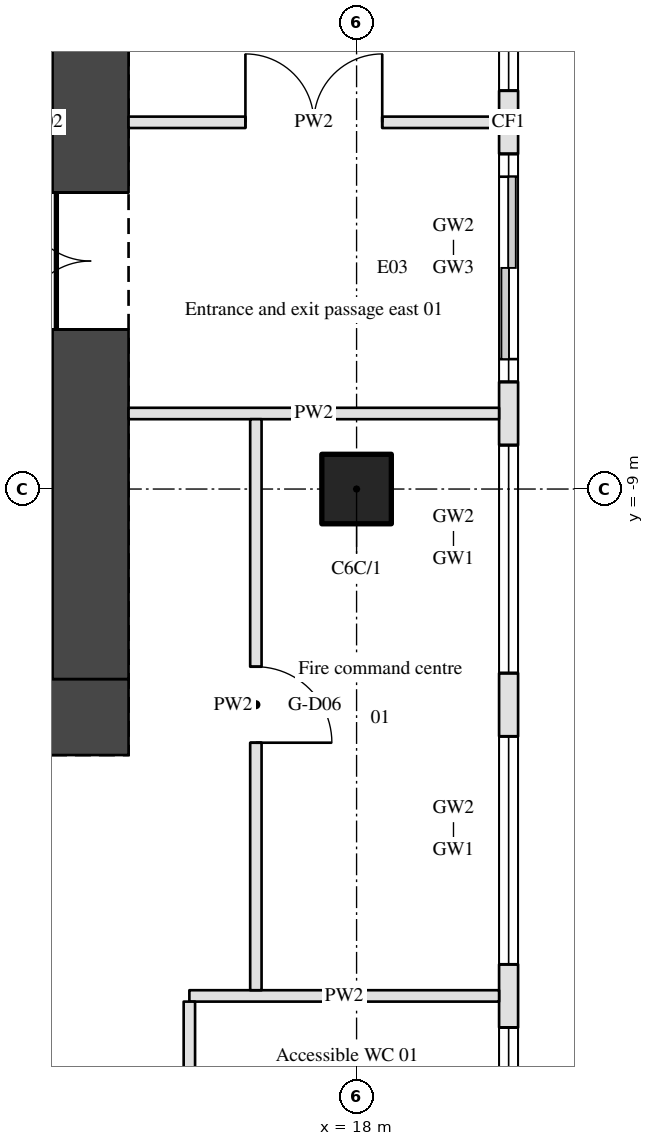
"""IFC4 building model, lengths in metres.
Left out: names, types, materials, properties, quantities, classifications, styles, units other than length and angle.
Written with IfcOpenShell. Run it as: python <this file> out.ifc"""

import sys

from ifc_helpers import new_model, si_unit, direction, frame, frame_2d, origin, origin_2d, place, context, subcontext, project, spatial, rectangle, hollow_circle, extrude, element, fill, save


model = new_model("IFC4")
c1 = context("Model", 3, precision=1e-05, world=origin(), true_north=direction((0.0, 1.0)))
c2 = subcontext(c1, "Body", "Model", "MODEL_VIEW")
j1 = project(units=[si_unit("LENGTHUNIT", "METRE"), si_unit("PLANEANGLEUNIT", "RADIAN")], contexts=[c1])
p1 = place(None, origin())
s1 = spatial("IfcSite", under=j1, at=p1, CompositionType="ELEMENT")
p2 = place(p1, origin())
s2 = spatial("IfcBuilding", under=s1, at=p2, CompositionType="ELEMENT")
p3 = place(p2, origin())
s3 = spatial("IfcBuildingStorey", under=s2, at=p3, CompositionType="ELEMENT", Elevation=0.0)
p4 = place(p3, frame((18.0, -9.0, 0.0), z_axis=(0.0, 0.0, 1.0), x_axis=(1.0, 0.0, 0.0)))
e1 = element("IfcColumn", 1, at=p4, inside=s3, PredefinedType="COLUMN", context=c2, shape_type="SweptSolid", body=[
    extrude(hollow_circle(Radius=0.457, WallThickness=0.05, at=origin_2d()), origin(), (0.0, 0.0, 1.0), 10.8),
])
p5 = place(p3, frame((-15.0, -12.0, 0.0), z_axis=(0.0, 0.0, 1.0), x_axis=(1.0, 0.0, 0.0)))
e2 = element("IfcWall", 2, at=p5, inside=s3, PredefinedType="SHEAR", context=c2, shape_type="SweptSolid", body=[
    extrude(rectangle(XDim=30.0, YDim=1.0, at=frame_2d((15.0, 0.0))), origin(), (0.0, 0.0, 1.0), 10.8),
])
p6 = place(p3, frame((14.5, -11.5, 0.0), z_axis=(0.0, 0.0, 1.0), x_axis=(0.0, 1.0, 0.0)))
e3 = element("IfcWall", 3, at=p6, inside=s3, PredefinedType="SHEAR", context=c2, shape_type="SweptSolid", body=[
    extrude(rectangle(XDim=14.65, YDim=1.0, at=frame_2d((7.325, 0.0))), origin(), (0.0, 0.0, 1.0), 10.8),
])
p7 = place(p6, frame((9.6, 0.0, 0.0)))
e4 = element("IfcOpeningElement", 4, at=p7, cuts=e3, PredefinedType="OPENING", context=c2, shape_type="SweptSolid", body=[
    extrude(rectangle(XDim=1.8, YDim=2.1, at=frame_2d((0.9, 1.05))), frame((0.0, 0.51, 0.0), z_axis=(0.0, -1.0, 0.0), x_axis=(1.0, 0.0, 0.0)), (0.0, 0.0, 1.0), 1.02),
])
p8 = place(p6, frame((4.6, 0.0, 0.0)))
e5 = element("IfcOpeningElement", 5, at=p8, cuts=e3, PredefinedType="OPENING", context=c2, shape_type="SweptSolid", body=[
    extrude(rectangle(XDim=1.8, YDim=2.1, at=frame_2d((0.9, 1.05))), frame((0.0, 0.51, 0.0), z_axis=(0.0, -1.0, 0.0), x_axis=(1.0, 0.0, 0.0)), (0.0, 0.0, 1.0), 1.02),
])
p9 = place(p3, frame((20.0, -19.375, 0.0), z_axis=(0.0, 0.0, 1.0), x_axis=(0.0, 1.0, 0.0)))
e6 = element("IfcWall", 6, at=p9, inside=s3, PredefinedType="STANDARD", context=c2, shape_type="SweptSolid", body=[
    extrude(rectangle(XDim=30.4, YDim=0.25, at=frame_2d((15.2, 0.0))), origin(), (0.0, 0.0, 1.0), 10.0),
])
p10 = place(p9, frame((0.291, 0.0, 0.15)))
e7 = element("IfcOpeningElement", 7, at=p10, cuts=e6, PredefinedType="OPENING", context=c2, shape_type="SweptSolid", body=[
    extrude(rectangle(XDim=3.0, YDim=4.2, at=frame_2d((1.5, 2.1))), frame((0.0, 0.135, 0.0), z_axis=(0.0, -1.0, 0.0), x_axis=(1.0, 0.0, 0.0)), (0.0, 0.0, 1.0), 0.27),
])
p11 = place(p9, frame((0.291, 0.0, 4.95)))
e8 = element("IfcOpeningElement", 8, at=p11, cuts=e6, PredefinedType="OPENING", context=c2, shape_type="SweptSolid", body=[
    extrude(rectangle(XDim=3.0, YDim=4.4, at=frame_2d((1.5, 2.2))), frame((0.0, 0.135, 0.0), z_axis=(0.0, -1.0, 0.0), x_axis=(1.0, 0.0, 0.0)), (0.0, 0.0, 1.0), 0.27),
])
p12 = place(p9, frame((4.122, 0.0, 0.15)))
e9 = element("IfcOpeningElement", 9, at=p12, cuts=e6, PredefinedType="OPENING", context=c2, shape_type="SweptSolid", body=[
    extrude(rectangle(XDim=3.0, YDim=4.2, at=frame_2d((1.5, 2.1))), frame((0.0, 0.135, 0.0), z_axis=(0.0, -1.0, 0.0), x_axis=(1.0, 0.0, 0.0)), (0.0, 0.0, 1.0), 0.27),
])
p13 = place(p9, frame((4.122, 0.0, 4.95)))
e10 = element("IfcOpeningElement", 10, at=p13, cuts=e6, PredefinedType="OPENING", context=c2, shape_type="SweptSolid", body=[
    extrude(rectangle(XDim=3.0, YDim=4.4, at=frame_2d((1.5, 2.2))), frame((0.0, 0.135, 0.0), z_axis=(0.0, -1.0, 0.0), x_axis=(1.0, 0.0, 0.0)), (0.0, 0.0, 1.0), 0.27),
])
p14 = place(p9, frame((7.953, 0.0, 0.15)))
e11 = element("IfcOpeningElement", 11, at=p14, cuts=e6, PredefinedType="OPENING", context=c2, shape_type="SweptSolid", body=[
    extrude(rectangle(XDim=3.0, YDim=4.2, at=frame_2d((1.5, 2.1))), frame((0.0, 0.135, 0.0), z_axis=(0.0, -1.0, 0.0), x_axis=(1.0, 0.0, 0.0)), (0.0, 0.0, 1.0), 0.27),
])
p15 = place(p9, frame((7.953, 0.0, 4.95)))
e12 = element("IfcOpeningElement", 12, at=p15, cuts=e6, PredefinedType="OPENING", context=c2, shape_type="SweptSolid", body=[
    extrude(rectangle(XDim=3.0, YDim=4.4, at=frame_2d((1.5, 2.2))), frame((0.0, 0.135, 0.0), z_axis=(0.0, -1.0, 0.0), x_axis=(1.0, 0.0, 0.0)), (0.0, 0.0, 1.0), 0.27),
])
p16 = place(p9, frame((12.084, 0.0, 0.0)))
e13 = element("IfcOpeningElement", 13, at=p16, cuts=e6, PredefinedType="OPENING", context=c2, shape_type="SweptSolid", body=[
    extrude(rectangle(XDim=2.4, YDim=2.6, at=frame_2d((1.2, 1.3))), frame((0.0, 0.135, 0.0), z_axis=(0.0, -1.0, 0.0), x_axis=(1.0, 0.0, 0.0)), (0.0, 0.0, 1.0), 0.27),
])
p17 = place(p9, frame((11.784, 0.0, 2.9)))
e14 = element("IfcOpeningElement", 14, at=p17, cuts=e6, PredefinedType="OPENING", context=c2, shape_type="SweptSolid", body=[
    extrude(rectangle(XDim=3.0, YDim=1.45, at=frame_2d((1.5, 0.725))), frame((0.0, 0.135, 0.0), z_axis=(0.0, -1.0, 0.0), x_axis=(1.0, 0.0, 0.0)), (0.0, 0.0, 1.0), 0.27),
])
p18 = place(p9, frame((11.784, 0.0, 4.95)))
e15 = element("IfcOpeningElement", 15, at=p18, cuts=e6, PredefinedType="OPENING", context=c2, shape_type="SweptSolid", body=[
    extrude(rectangle(XDim=3.0, YDim=4.4, at=frame_2d((1.5, 2.2))), frame((0.0, 0.135, 0.0), z_axis=(0.0, -1.0, 0.0), x_axis=(1.0, 0.0, 0.0)), (0.0, 0.0, 1.0), 0.27),
])
p19 = place(p9, frame((15.616, 0.0, 0.15)))
e16 = element("IfcOpeningElement", 16, at=p19, cuts=e6, PredefinedType="OPENING", context=c2, shape_type="SweptSolid", body=[
    extrude(rectangle(XDim=3.0, YDim=4.2, at=frame_2d((1.5, 2.1))), frame((0.0, 0.135, 0.0), z_axis=(0.0, -1.0, 0.0), x_axis=(1.0, 0.0, 0.0)), (0.0, 0.0, 1.0), 0.27),
])
p20 = place(p9, frame((15.616, 0.0, 4.95)))
e17 = element("IfcOpeningElement", 17, at=p20, cuts=e6, PredefinedType="OPENING", context=c2, shape_type="SweptSolid", body=[
    extrude(rectangle(XDim=3.0, YDim=4.4, at=frame_2d((1.5, 2.2))), frame((0.0, 0.135, 0.0), z_axis=(0.0, -1.0, 0.0), x_axis=(1.0, 0.0, 0.0)), (0.0, 0.0, 1.0), 0.27),
])
p21 = place(p9, frame((19.447, 0.0, 0.15)))
e18 = element("IfcOpeningElement", 18, at=p21, cuts=e6, PredefinedType="OPENING", context=c2, shape_type="SweptSolid", body=[
    extrude(rectangle(XDim=3.0, YDim=4.2, at=frame_2d((1.5, 2.1))), frame((0.0, 0.135, 0.0), z_axis=(0.0, -1.0, 0.0), x_axis=(1.0, 0.0, 0.0)), (0.0, 0.0, 1.0), 0.27),
])
p22 = place(p9, frame((19.447, 0.0, 4.95)))
e19 = element("IfcOpeningElement", 19, at=p22, cuts=e6, PredefinedType="OPENING", context=c2, shape_type="SweptSolid", body=[
    extrude(rectangle(XDim=3.0, YDim=4.4, at=frame_2d((1.5, 2.2))), frame((0.0, 0.135, 0.0), z_axis=(0.0, -1.0, 0.0), x_axis=(1.0, 0.0, 0.0)), (0.0, 0.0, 1.0), 0.27),
])
p23 = place(p9, frame((23.278, 0.0, 0.15)))
e20 = element("IfcOpeningElement", 20, at=p23, cuts=e6, PredefinedType="OPENING", context=c2, shape_type="SweptSolid", body=[
    extrude(rectangle(XDim=3.0, YDim=4.2, at=frame_2d((1.5, 2.1))), frame((0.0, 0.135, 0.0), z_axis=(0.0, -1.0, 0.0), x_axis=(1.0, 0.0, 0.0)), (0.0, 0.0, 1.0), 0.27),
])
p24 = place(p9, frame((23.278, 0.0, 4.95)))
e21 = element("IfcOpeningElement", 21, at=p24, cuts=e6, PredefinedType="OPENING", context=c2, shape_type="SweptSolid", body=[
    extrude(rectangle(XDim=3.0, YDim=4.4, at=frame_2d((1.5, 2.2))), frame((0.0, 0.135, 0.0), z_axis=(0.0, -1.0, 0.0), x_axis=(1.0, 0.0, 0.0)), (0.0, 0.0, 1.0), 0.27),
])
p25 = place(p9, frame((27.109, 0.0, 0.15)))
e22 = element("IfcOpeningElement", 22, at=p25, cuts=e6, PredefinedType="OPENING", context=c2, shape_type="SweptSolid", body=[
    extrude(rectangle(XDim=3.0, YDim=4.2, at=frame_2d((1.5, 2.1))), frame((0.0, 0.135, 0.0), z_axis=(0.0, -1.0, 0.0), x_axis=(1.0, 0.0, 0.0)), (0.0, 0.0, 1.0), 0.27),
])
p26 = place(p9, frame((27.109, 0.0, 4.95)))
e23 = element("IfcOpeningElement", 23, at=p26, cuts=e6, PredefinedType="OPENING", context=c2, shape_type="SweptSolid", body=[
    extrude(rectangle(XDim=3.0, YDim=4.4, at=frame_2d((1.5, 2.2))), frame((0.0, 0.135, 0.0), z_axis=(0.0, -1.0, 0.0), x_axis=(1.0, 0.0, 0.0)), (0.0, 0.0, 1.0), 0.27),
])
p27 = place(p3, frame((15.8, -15.669, 0.0), z_axis=(0.0, 0.0, 1.0), x_axis=(1.0, 0.0, 0.0)))
e24 = element("IfcWall", 24, at=p27, inside=s3, PredefinedType="PARTITIONING", context=c2, shape_type="SweptSolid", body=[
    extrude(rectangle(XDim=4.075, YDim=0.15, at=frame_2d((2.038, 0.0))), origin(), (0.0, 0.0, 1.0), 9.86),
])
p28 = place(p3, frame((15.0, -8.006, 0.0), z_axis=(0.0, 0.0, 1.0), x_axis=(1.0, 0.0, 0.0)))
e25 = element("IfcWall", 25, at=p28, inside=s3, PredefinedType="PARTITIONING", context=c2, shape_type="SweptSolid", body=[
    extrude(rectangle(XDim=4.875, YDim=0.15, at=frame_2d((2.438, 0.0))), origin(), (0.0, 0.0, 1.0), 9.86),
])
p29 = place(p3, frame((15.0, -4.175, 0.0), z_axis=(0.0, 0.0, 1.0), x_axis=(1.0, 0.0, 0.0)))
e26 = element("IfcWall", 26, at=p29, inside=s3, PredefinedType="PARTITIONING", context=c2, shape_type="SweptSolid", body=[
    extrude(rectangle(XDim=4.875, YDim=0.15, at=frame_2d((2.438, 0.0))), origin(), (0.0, 0.0, 1.0), 9.86),
])
p30 = place(p29, frame((1.538, 0.0, 0.0)))
e27 = element("IfcOpeningElement", 27, at=p30, cuts=e26, PredefinedType="OPENING", context=c2, shape_type="SweptSolid", body=[
    extrude(rectangle(XDim=1.8, YDim=2.1, at=frame_2d((0.9, 1.05))), frame((0.0, 0.085, 0.0), z_axis=(0.0, -1.0, 0.0), x_axis=(1.0, 0.0, 0.0)), (0.0, 0.0, 1.0), 0.17),
])
p31 = place(p3, frame((15.8, -15.744, 0.0), z_axis=(0.0, 0.0, 1.0), x_axis=(0.0, -1.0, 0.0)))
e28 = element("IfcWall", 28, at=p31, inside=s3, PredefinedType="PARTITIONING", context=c2, shape_type="SweptSolid", body=[
    extrude(rectangle(XDim=3.631, YDim=0.15, at=frame_2d((1.815, 0.0))), origin(), (0.0, 0.0, 1.0), 9.86),
])
p32 = place(p31, frame((1.365, 0.0, 0.0)))
e29 = element("IfcOpeningElement", 29, at=p32, cuts=e28, PredefinedType="OPENING", context=c2, shape_type="SweptSolid", body=[
    extrude(rectangle(XDim=0.9, YDim=2.1, at=frame_2d((0.45, 1.05))), frame((0.0, 0.085, 0.0), z_axis=(0.0, -1.0, 0.0), x_axis=(1.0, 0.0, 0.0)), (0.0, 0.0, 1.0), 0.17),
])
p33 = place(p3, frame((16.675, -8.081, 0.0), z_axis=(0.0, 0.0, 1.0), x_axis=(0.0, -1.0, 0.0)))
e30 = element("IfcWall", 30, at=p33, inside=s3, PredefinedType="PARTITIONING", context=c2, shape_type="SweptSolid", body=[
    extrude(rectangle(XDim=7.513, YDim=0.15, at=frame_2d((3.756, 0.0))), origin(), (0.0, 0.0, 1.0), 9.86),
])
p34 = place(p33, frame((3.257, 0.0, 0.0)))
e31 = element("IfcOpeningElement", 31, at=p34, cuts=e30, PredefinedType="OPENING", context=c2, shape_type="SweptSolid", body=[
    extrude(rectangle(XDim=1.0, YDim=2.1, at=frame_2d((0.5, 1.05))), frame((0.0, 0.085, 0.0), z_axis=(0.0, -1.0, 0.0), x_axis=(1.0, 0.0, 0.0)), (0.0, 0.0, 1.0), 0.17),
])
p35 = place(p10, origin())
e32 = element("IfcWindow", 32, at=p35, inside=s3, PartitioningType="DOUBLE_PANEL_HORIZONTAL", PredefinedType="WINDOW", context=c2, shape_type="SweptSolid", body=[
    extrude(rectangle(XDim=3.0, YDim=4.2, at=frame_2d((1.5, 2.1))), frame((0.0, 0.03, 0.0), z_axis=(0.0, -1.0, 0.0), x_axis=(1.0, 0.0, 0.0)), (0.0, 0.0, 1.0), 0.06),
])
fill(e7, e32)
p36 = place(p11, origin())
e33 = element("IfcWindow", 33, at=p36, inside=s3, PartitioningType="DOUBLE_PANEL_HORIZONTAL", PredefinedType="WINDOW", context=c2, shape_type="SweptSolid", body=[
    extrude(rectangle(XDim=3.0, YDim=4.4, at=frame_2d((1.5, 2.2))), frame((0.0, 0.03, 0.0), z_axis=(0.0, -1.0, 0.0), x_axis=(1.0, 0.0, 0.0)), (0.0, 0.0, 1.0), 0.06),
])
fill(e8, e33)
p37 = place(p12, origin())
e34 = element("IfcWindow", 34, at=p37, inside=s3, PartitioningType="DOUBLE_PANEL_HORIZONTAL", PredefinedType="WINDOW", context=c2, shape_type="SweptSolid", body=[
    extrude(rectangle(XDim=3.0, YDim=4.2, at=frame_2d((1.5, 2.1))), frame((0.0, 0.03, 0.0), z_axis=(0.0, -1.0, 0.0), x_axis=(1.0, 0.0, 0.0)), (0.0, 0.0, 1.0), 0.06),
])
fill(e9, e34)
p38 = place(p13, origin())
e35 = element("IfcWindow", 35, at=p38, inside=s3, PartitioningType="DOUBLE_PANEL_HORIZONTAL", PredefinedType="WINDOW", context=c2, shape_type="SweptSolid", body=[
    extrude(rectangle(XDim=3.0, YDim=4.4, at=frame_2d((1.5, 2.2))), frame((0.0, 0.03, 0.0), z_axis=(0.0, -1.0, 0.0), x_axis=(1.0, 0.0, 0.0)), (0.0, 0.0, 1.0), 0.06),
])
fill(e10, e35)
p39 = place(p14, origin())
e36 = element("IfcWindow", 36, at=p39, inside=s3, PartitioningType="DOUBLE_PANEL_HORIZONTAL", PredefinedType="WINDOW", context=c2, shape_type="SweptSolid", body=[
    extrude(rectangle(XDim=3.0, YDim=4.2, at=frame_2d((1.5, 2.1))), frame((0.0, 0.03, 0.0), z_axis=(0.0, -1.0, 0.0), x_axis=(1.0, 0.0, 0.0)), (0.0, 0.0, 1.0), 0.06),
])
fill(e11, e36)
p40 = place(p15, origin())
e37 = element("IfcWindow", 37, at=p40, inside=s3, PartitioningType="DOUBLE_PANEL_HORIZONTAL", PredefinedType="WINDOW", context=c2, shape_type="SweptSolid", body=[
    extrude(rectangle(XDim=3.0, YDim=4.4, at=frame_2d((1.5, 2.2))), frame((0.0, 0.03, 0.0), z_axis=(0.0, -1.0, 0.0), x_axis=(1.0, 0.0, 0.0)), (0.0, 0.0, 1.0), 0.06),
])
fill(e12, e37)
p41 = place(p16, origin())
e38 = element("IfcDoor", 38, at=p41, inside=s3, OperationType="DOUBLE_DOOR_SLIDING", PredefinedType="DOOR", context=c2, shape_type="SweptSolid", body=[
    extrude(rectangle(XDim=2.4, YDim=2.6, at=frame_2d((1.2, 1.3))), frame((0.0, 0.025, 0.0), z_axis=(0.0, -1.0, 0.0), x_axis=(1.0, 0.0, 0.0)), (0.0, 0.0, 1.0), 0.05),
])
fill(e13, e38)
p42 = place(p17, origin())
e39 = element("IfcWindow", 39, at=p42, inside=s3, PartitioningType="SINGLE_PANEL", PredefinedType="WINDOW", context=c2, shape_type="SweptSolid", body=[
    extrude(rectangle(XDim=3.0, YDim=1.45, at=frame_2d((1.5, 0.725))), frame((0.0, 0.03, 0.0), z_axis=(0.0, -1.0, 0.0), x_axis=(1.0, 0.0, 0.0)), (0.0, 0.0, 1.0), 0.06),
])
fill(e14, e39)
p43 = place(p18, origin())
e40 = element("IfcWindow", 40, at=p43, inside=s3, PartitioningType="DOUBLE_PANEL_HORIZONTAL", PredefinedType="WINDOW", context=c2, shape_type="SweptSolid", body=[
    extrude(rectangle(XDim=3.0, YDim=4.4, at=frame_2d((1.5, 2.2))), frame((0.0, 0.03, 0.0), z_axis=(0.0, -1.0, 0.0), x_axis=(1.0, 0.0, 0.0)), (0.0, 0.0, 1.0), 0.06),
])
fill(e15, e40)
p44 = place(p19, origin())
e41 = element("IfcWindow", 41, at=p44, inside=s3, PartitioningType="DOUBLE_PANEL_HORIZONTAL", PredefinedType="WINDOW", context=c2, shape_type="SweptSolid", body=[
    extrude(rectangle(XDim=3.0, YDim=4.2, at=frame_2d((1.5, 2.1))), frame((0.0, 0.03, 0.0), z_axis=(0.0, -1.0, 0.0), x_axis=(1.0, 0.0, 0.0)), (0.0, 0.0, 1.0), 0.06),
])
fill(e16, e41)
p45 = place(p20, origin())
e42 = element("IfcWindow", 42, at=p45, inside=s3, PartitioningType="DOUBLE_PANEL_HORIZONTAL", PredefinedType="WINDOW", context=c2, shape_type="SweptSolid", body=[
    extrude(rectangle(XDim=3.0, YDim=4.4, at=frame_2d((1.5, 2.2))), frame((0.0, 0.03, 0.0), z_axis=(0.0, -1.0, 0.0), x_axis=(1.0, 0.0, 0.0)), (0.0, 0.0, 1.0), 0.06),
])
fill(e17, e42)
p46 = place(p30, origin())
e43 = element("IfcDoor", 43, at=p46, inside=s3, OperationType="DOUBLE_DOOR_SINGLE_SWING", PredefinedType="DOOR", context=c2, shape_type="SweptSolid", body=[
    extrude(rectangle(XDim=1.8, YDim=2.1, at=frame_2d((0.9, 1.05))), frame((0.0, 0.025, 0.0), z_axis=(0.0, -1.0, 0.0), x_axis=(1.0, 0.0, 0.0)), (0.0, 0.0, 1.0), 0.05),
])
fill(e27, e43)
p47 = place(p8, origin())
e44 = element("IfcDoor", 44, at=p47, inside=s3, OperationType="DOUBLE_DOOR_SINGLE_SWING", PredefinedType="DOOR", context=c2, shape_type="SweptSolid", body=[
    extrude(rectangle(XDim=1.8, YDim=2.1, at=frame_2d((0.9, 1.05))), frame((0.0, 0.025, 0.0), z_axis=(0.0, -1.0, 0.0), x_axis=(1.0, 0.0, 0.0)), (0.0, 0.0, 1.0), 0.05),
])
fill(e5, e44)
p48 = place(p34, origin())
e45 = element("IfcDoor", 45, at=p48, inside=s3, OperationType="SINGLE_SWING_RIGHT", PredefinedType="DOOR", context=c2, shape_type="SweptSolid", body=[
    extrude(rectangle(XDim=1.0, YDim=2.1, at=frame_2d((0.5, 1.05))), frame((0.0, 0.025, 0.0), z_axis=(0.0, -1.0, 0.0), x_axis=(1.0, 0.0, 0.0)), (0.0, 0.0, 1.0), 0.05),
])
fill(e31, e45)
save(model, sys.argv[1])
